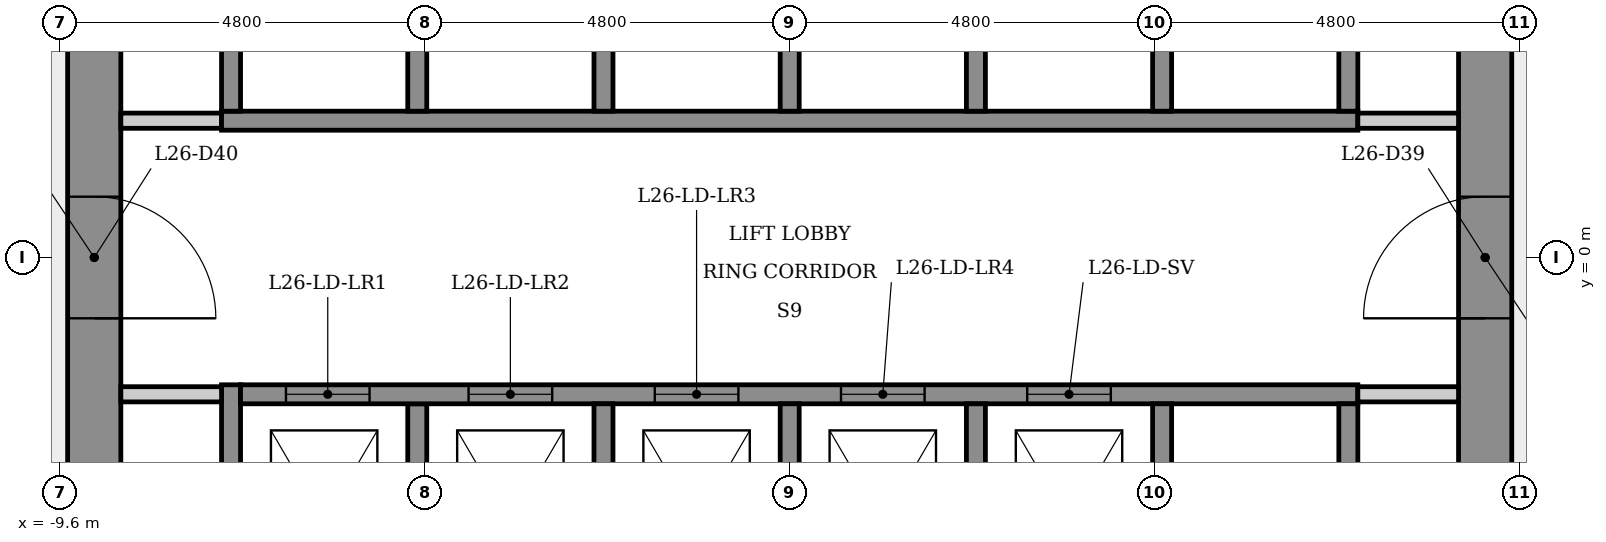
"""IFC4 building model, lengths in metres.
Left out: names, types, materials, properties, quantities, classifications, styles, units other than length and angle.
Written with IfcOpenShell. Run it as: python <this file> out.ifc"""

import sys

from ifc_helpers import new_model, si_unit, direction, frame, frame_2d, origin, place, context, subcontext, project, spatial, rectangle, extrude, element, fill, save


model = new_model("IFC4")
c1 = context("Model", 3, precision=1e-05, world=origin(), true_north=direction((0.0, 1.0)))
c2 = subcontext(c1, "Body", "Model", "MODEL_VIEW")
j1 = project(units=[si_unit("LENGTHUNIT", "METRE"), si_unit("PLANEANGLEUNIT", "RADIAN")], contexts=[c1])
p1 = place(None, origin())
s1 = spatial("IfcSite", under=j1, at=p1, CompositionType="ELEMENT")
p2 = place(p1, origin())
s2 = spatial("IfcBuilding", under=s1, at=p2, CompositionType="ELEMENT")
p3 = place(p2, frame((0.0, 0.0, 100.1)))
s3 = spatial("IfcBuildingStorey", under=s2, at=p3, CompositionType="ELEMENT", Elevation=100.1)
p4 = place(p3, frame((9.15, -5.485, 0.0), z_axis=(0.0, 0.0, 1.0), x_axis=(0.0, 1.0, 0.0)))
e1 = element("IfcWall", 1, at=p4, inside=s3, PredefinedType="SHEAR", context=c2, shape_type="SweptSolid", body=[
    extrude(rectangle(XDim=10.97, YDim=0.7, at=frame_2d((5.485, 0.0))), origin(), (0.0, 0.0, 1.0), 3.4),
])
p5 = place(p4, frame((4.685, 0.0, 0.0)))
e2 = element("IfcOpeningElement", 2, at=p5, cuts=e1, PredefinedType="OPENING", context=c2, shape_type="SweptSolid", body=[
    extrude(rectangle(XDim=1.6, YDim=2.1, at=frame_2d((0.8, 1.05))), frame((0.0, 0.36, 0.0), z_axis=(0.0, -1.0, 0.0), x_axis=(1.0, 0.0, 0.0)), (0.0, 0.0, 1.0), 0.72),
])
p6 = place(p3, frame((-9.15, 5.485, 0.0), z_axis=(0.0, 0.0, 1.0), x_axis=(0.0, -1.0, 0.0)))
e3 = element("IfcWall", 3, at=p6, inside=s3, PredefinedType="SHEAR", context=c2, shape_type="SweptSolid", body=[
    extrude(rectangle(XDim=10.97, YDim=0.7, at=frame_2d((5.485, 0.0))), origin(), (0.0, 0.0, 1.0), 3.4),
])
p7 = place(p6, frame((4.685, 0.0, 0.0)))
e4 = element("IfcOpeningElement", 4, at=p7, cuts=e3, PredefinedType="OPENING", context=c2, shape_type="SweptSolid", body=[
    extrude(rectangle(XDim=1.6, YDim=2.1, at=frame_2d((0.8, 1.05))), frame((0.0, 0.36, 0.0), z_axis=(0.0, -1.0, 0.0), x_axis=(1.0, 0.0, 0.0)), (0.0, 0.0, 1.0), 0.72),
])
p8 = place(p3, frame((-8.8, 1.8, 0.0), z_axis=(0.0, 0.0, 1.0), x_axis=(1.0, 0.0, 0.0)))
e5 = element("IfcWall", 5, at=p8, inside=s3, PredefinedType="PARTITIONING", context=c2, shape_type="SweptSolid", body=[
    extrude(rectangle(XDim=1.325, YDim=0.2, at=frame_2d((0.663, 0.0))), origin(), (0.0, 0.0, 1.0), 3.05),
])
p9 = place(p3, frame((-7.475, 1.8, 0.0), z_axis=(0.0, 0.0, 1.0), x_axis=(1.0, 0.0, 0.0)))
e6 = element("IfcWall", 6, at=p9, inside=s3, PredefinedType="SHEAR", context=c2, shape_type="SweptSolid", body=[
    extrude(rectangle(XDim=14.95, YDim=0.25, at=frame_2d((7.475, 0.0))), origin(), (0.0, 0.0, 1.0), 3.05),
])
p10 = place(p3, frame((-7.35, -5.846, 0.0), z_axis=(0.0, 0.0, 1.0), x_axis=(0.0, 1.0, 0.0)))
e7 = element("IfcWall", 7, at=p10, inside=s3, PredefinedType="SHEAR", context=c2, shape_type="SweptSolid", body=[
    extrude(rectangle(XDim=4.171, YDim=0.25, at=frame_2d((2.085, 0.0))), origin(), (0.0, 0.0, 1.0), 3.05),
])
p11 = place(p3, frame((-7.35, 1.925, 0.0), z_axis=(0.0, 0.0, 1.0), x_axis=(0.0, 1.0, 0.0)))
e8 = element("IfcWall", 8, at=p11, inside=s3, PredefinedType="SHEAR", context=c2, shape_type="SweptSolid", body=[
    extrude(rectangle(XDim=3.921, YDim=0.25, at=frame_2d((1.96, 0.0))), origin(), (0.0, 0.0, 1.0), 3.05),
])
p12 = place(p3, frame((-7.475, -1.8, 0.0), z_axis=(0.0, 0.0, 1.0), x_axis=(-1.0, 0.0, 0.0)))
e9 = element("IfcWall", 9, at=p12, inside=s3, PredefinedType="PARTITIONING", context=c2, shape_type="SweptSolid", body=[
    extrude(rectangle(XDim=1.325, YDim=0.2, at=frame_2d((0.663, 0.0))), origin(), (0.0, 0.0, 1.0), 3.05),
])
for number, where, z_axis, x_axis in (
    (10, (-4.9, -1.925, 0.0), (0.0, 0.0, 1.0), (0.0, -1.0, 0.0)),
    (11, (-4.9, 5.025, 0.0), (0.0, 0.0, 1.0), (0.0, -1.0, 0.0)),
):
    element("IfcWall", number, at=place(p3, frame(where, z_axis=z_axis, x_axis=x_axis)), inside=s3, PredefinedType="SHEAR", context=c2, shape_type="SweptSolid", body=[
        extrude(rectangle(XDim=3.1, YDim=0.25, at=frame_2d((1.55, 0.0))), origin(), (0.0, 0.0, 1.0), 3.4),
    ])
p13 = place(p3, frame((-7.225, -1.8, 0.0), z_axis=(0.0, 0.0, 1.0), x_axis=(1.0, 0.0, 0.0)))
e12 = element("IfcWall", 12, at=p13, inside=s3, PredefinedType="SHEAR", context=c2, shape_type="SweptSolid", body=[
    extrude(rectangle(XDim=14.7, YDim=0.25, at=frame_2d((7.35, 0.0))), origin(), (0.0, 0.0, 1.0), 3.05),
])
p14 = place(p13, frame((0.597, 0.0, 0.0)))
e13 = element("IfcOpeningElement", 13, at=p14, cuts=e12, PredefinedType="OPENING", context=c2, shape_type="SweptSolid", body=[
    extrude(rectangle(XDim=1.1, YDim=2.1, at=frame_2d((0.55, 1.05))), frame((0.0, 0.135, 0.0), z_axis=(0.0, -1.0, 0.0), x_axis=(1.0, 0.0, 0.0)), (0.0, 0.0, 1.0), 0.27),
])
p15 = place(p13, frame((3.0, 0.0, 0.0)))
e14 = element("IfcOpeningElement", 14, at=p15, cuts=e12, PredefinedType="OPENING", context=c2, shape_type="SweptSolid", body=[
    extrude(rectangle(XDim=1.1, YDim=2.1, at=frame_2d((0.55, 1.05))), frame((0.0, 0.135, 0.0), z_axis=(0.0, -1.0, 0.0), x_axis=(1.0, 0.0, 0.0)), (0.0, 0.0, 1.0), 0.27),
])
p16 = place(p13, frame((5.45, 0.0, 0.0)))
e15 = element("IfcOpeningElement", 15, at=p16, cuts=e12, PredefinedType="OPENING", context=c2, shape_type="SweptSolid", body=[
    extrude(rectangle(XDim=1.1, YDim=2.1, at=frame_2d((0.55, 1.05))), frame((0.0, 0.135, 0.0), z_axis=(0.0, -1.0, 0.0), x_axis=(1.0, 0.0, 0.0)), (0.0, 0.0, 1.0), 0.27),
])
p17 = place(p13, frame((7.9, 0.0, 0.0)))
e16 = element("IfcOpeningElement", 16, at=p17, cuts=e12, PredefinedType="OPENING", context=c2, shape_type="SweptSolid", body=[
    extrude(rectangle(XDim=1.1, YDim=2.1, at=frame_2d((0.55, 1.05))), frame((0.0, 0.135, 0.0), z_axis=(0.0, -1.0, 0.0), x_axis=(1.0, 0.0, 0.0)), (0.0, 0.0, 1.0), 0.27),
])
p18 = place(p13, frame((10.35, 0.0, 0.0)))
e17 = element("IfcOpeningElement", 17, at=p18, cuts=e12, PredefinedType="OPENING", context=c2, shape_type="SweptSolid", body=[
    extrude(rectangle(XDim=1.1, YDim=2.1, at=frame_2d((0.55, 1.05))), frame((0.0, 0.135, 0.0), z_axis=(0.0, -1.0, 0.0), x_axis=(1.0, 0.0, 0.0)), (0.0, 0.0, 1.0), 0.27),
])
for number, where, z_axis, x_axis in (
    (18, (-2.45, -1.925, 0.0), (0.0, 0.0, 1.0), (0.0, -1.0, 0.0)),
    (19, (-2.45, 5.025, 0.0), (0.0, 0.0, 1.0), (0.0, -1.0, 0.0)),
    (20, (0.0, -1.925, 0.0), (0.0, 0.0, 1.0), (0.0, -1.0, 0.0)),
    (21, (0.0, 5.025, 0.0), (0.0, 0.0, 1.0), (0.0, -1.0, 0.0)),
    (22, (2.45, -1.925, 0.0), (0.0, 0.0, 1.0), (0.0, -1.0, 0.0)),
    (23, (2.45, 5.025, 0.0), (0.0, 0.0, 1.0), (0.0, -1.0, 0.0)),
    (24, (4.9, -1.925, 0.0), (0.0, 0.0, 1.0), (0.0, -1.0, 0.0)),
    (25, (4.9, 5.025, 0.0), (0.0, 0.0, 1.0), (0.0, -1.0, 0.0)),
):
    element("IfcWall", number, at=place(p3, frame(where, z_axis=z_axis, x_axis=x_axis)), inside=s3, PredefinedType="SHEAR", context=c2, shape_type="SweptSolid", body=[
        extrude(rectangle(XDim=3.1, YDim=0.25, at=frame_2d((1.55, 0.0))), origin(), (0.0, 0.0, 1.0), 3.4),
    ])
p19 = place(p3, frame((7.475, 1.8, 0.0), z_axis=(0.0, 0.0, 1.0), x_axis=(1.0, 0.0, 0.0)))
e26 = element("IfcWall", 26, at=p19, inside=s3, PredefinedType="PARTITIONING", context=c2, shape_type="SweptSolid", body=[
    extrude(rectangle(XDim=1.325, YDim=0.2, at=frame_2d((0.663, 0.0))), origin(), (0.0, 0.0, 1.0), 3.05),
])
for number, where, z_axis, x_axis in (
    (27, (7.35, -1.925, 0.0), (0.0, 0.0, 1.0), (0.0, -1.0, 0.0)),
    (28, (7.35, 5.025, 0.0), (0.0, 0.0, 1.0), (0.0, -1.0, 0.0)),
):
    element("IfcWall", number, at=place(p3, frame(where, z_axis=z_axis, x_axis=x_axis)), inside=s3, PredefinedType="SHEAR", context=c2, shape_type="SweptSolid", body=[
        extrude(rectangle(XDim=3.1, YDim=0.25, at=frame_2d((1.55, 0.0))), origin(), (0.0, 0.0, 1.0), 3.4),
    ])
p20 = place(p3, frame((8.8, -1.8, 0.0), z_axis=(0.0, 0.0, 1.0), x_axis=(-1.0, 0.0, 0.0)))
e29 = element("IfcWall", 29, at=p20, inside=s3, PredefinedType="PARTITIONING", context=c2, shape_type="SweptSolid", body=[
    extrude(rectangle(XDim=1.325, YDim=0.2, at=frame_2d((0.663, 0.0))), origin(), (0.0, 0.0, 1.0), 3.05),
])
p21 = place(p14, origin())
e30 = element("IfcDoor", 30, at=p21, inside=s3, OperationType="SLIDING_TO_LEFT", PredefinedType="DOOR", context=c2, shape_type="SweptSolid", body=[
    extrude(rectangle(XDim=1.1, YDim=2.1, at=frame_2d((0.55, 1.05))), frame((0.0, 0.025, 0.0), z_axis=(0.0, -1.0, 0.0), x_axis=(1.0, 0.0, 0.0)), (0.0, 0.0, 1.0), 0.05),
])
fill(e13, e30)
p22 = place(p15, origin())
e31 = element("IfcDoor", 31, at=p22, inside=s3, OperationType="SLIDING_TO_LEFT", PredefinedType="DOOR", context=c2, shape_type="SweptSolid", body=[
    extrude(rectangle(XDim=1.1, YDim=2.1, at=frame_2d((0.55, 1.05))), frame((0.0, 0.025, 0.0), z_axis=(0.0, -1.0, 0.0), x_axis=(1.0, 0.0, 0.0)), (0.0, 0.0, 1.0), 0.05),
])
fill(e14, e31)
p23 = place(p16, origin())
e32 = element("IfcDoor", 32, at=p23, inside=s3, OperationType="SLIDING_TO_LEFT", PredefinedType="DOOR", context=c2, shape_type="SweptSolid", body=[
    extrude(rectangle(XDim=1.1, YDim=2.1, at=frame_2d((0.55, 1.05))), frame((0.0, 0.025, 0.0), z_axis=(0.0, -1.0, 0.0), x_axis=(1.0, 0.0, 0.0)), (0.0, 0.0, 1.0), 0.05),
])
fill(e15, e32)
p24 = place(p17, origin())
e33 = element("IfcDoor", 33, at=p24, inside=s3, OperationType="SLIDING_TO_LEFT", PredefinedType="DOOR", context=c2, shape_type="SweptSolid", body=[
    extrude(rectangle(XDim=1.1, YDim=2.1, at=frame_2d((0.55, 1.05))), frame((0.0, 0.025, 0.0), z_axis=(0.0, -1.0, 0.0), x_axis=(1.0, 0.0, 0.0)), (0.0, 0.0, 1.0), 0.05),
])
fill(e16, e33)
p25 = place(p18, origin())
e34 = element("IfcDoor", 34, at=p25, inside=s3, OperationType="SLIDING_TO_LEFT", PredefinedType="DOOR", context=c2, shape_type="SweptSolid", body=[
    extrude(rectangle(XDim=1.1, YDim=2.1, at=frame_2d((0.55, 1.05))), frame((0.0, 0.025, 0.0), z_axis=(0.0, -1.0, 0.0), x_axis=(1.0, 0.0, 0.0)), (0.0, 0.0, 1.0), 0.05),
])
fill(e17, e34)
p26 = place(p5, origin())
e35 = element("IfcDoor", 35, at=p26, inside=s3, OperationType="SINGLE_SWING_LEFT", PredefinedType="DOOR", context=c2, shape_type="SweptSolid", body=[
    extrude(rectangle(XDim=1.6, YDim=2.1, at=frame_2d((0.8, 1.05))), frame((0.0, 0.025, 0.0), z_axis=(0.0, -1.0, 0.0), x_axis=(1.0, 0.0, 0.0)), (0.0, 0.0, 1.0), 0.05),
])
fill(e2, e35)
p27 = place(p7, origin())
e36 = element("IfcDoor", 36, at=p27, inside=s3, OperationType="SINGLE_SWING_RIGHT", PredefinedType="DOOR", context=c2, shape_type="SweptSolid", body=[
    extrude(rectangle(XDim=1.6, YDim=2.1, at=frame_2d((0.8, 1.05))), frame((0.0, 0.025, 0.0), z_axis=(0.0, -1.0, 0.0), x_axis=(1.0, 0.0, 0.0)), (0.0, 0.0, 1.0), 0.05),
])
fill(e4, e36)
save(model, sys.argv[1])
